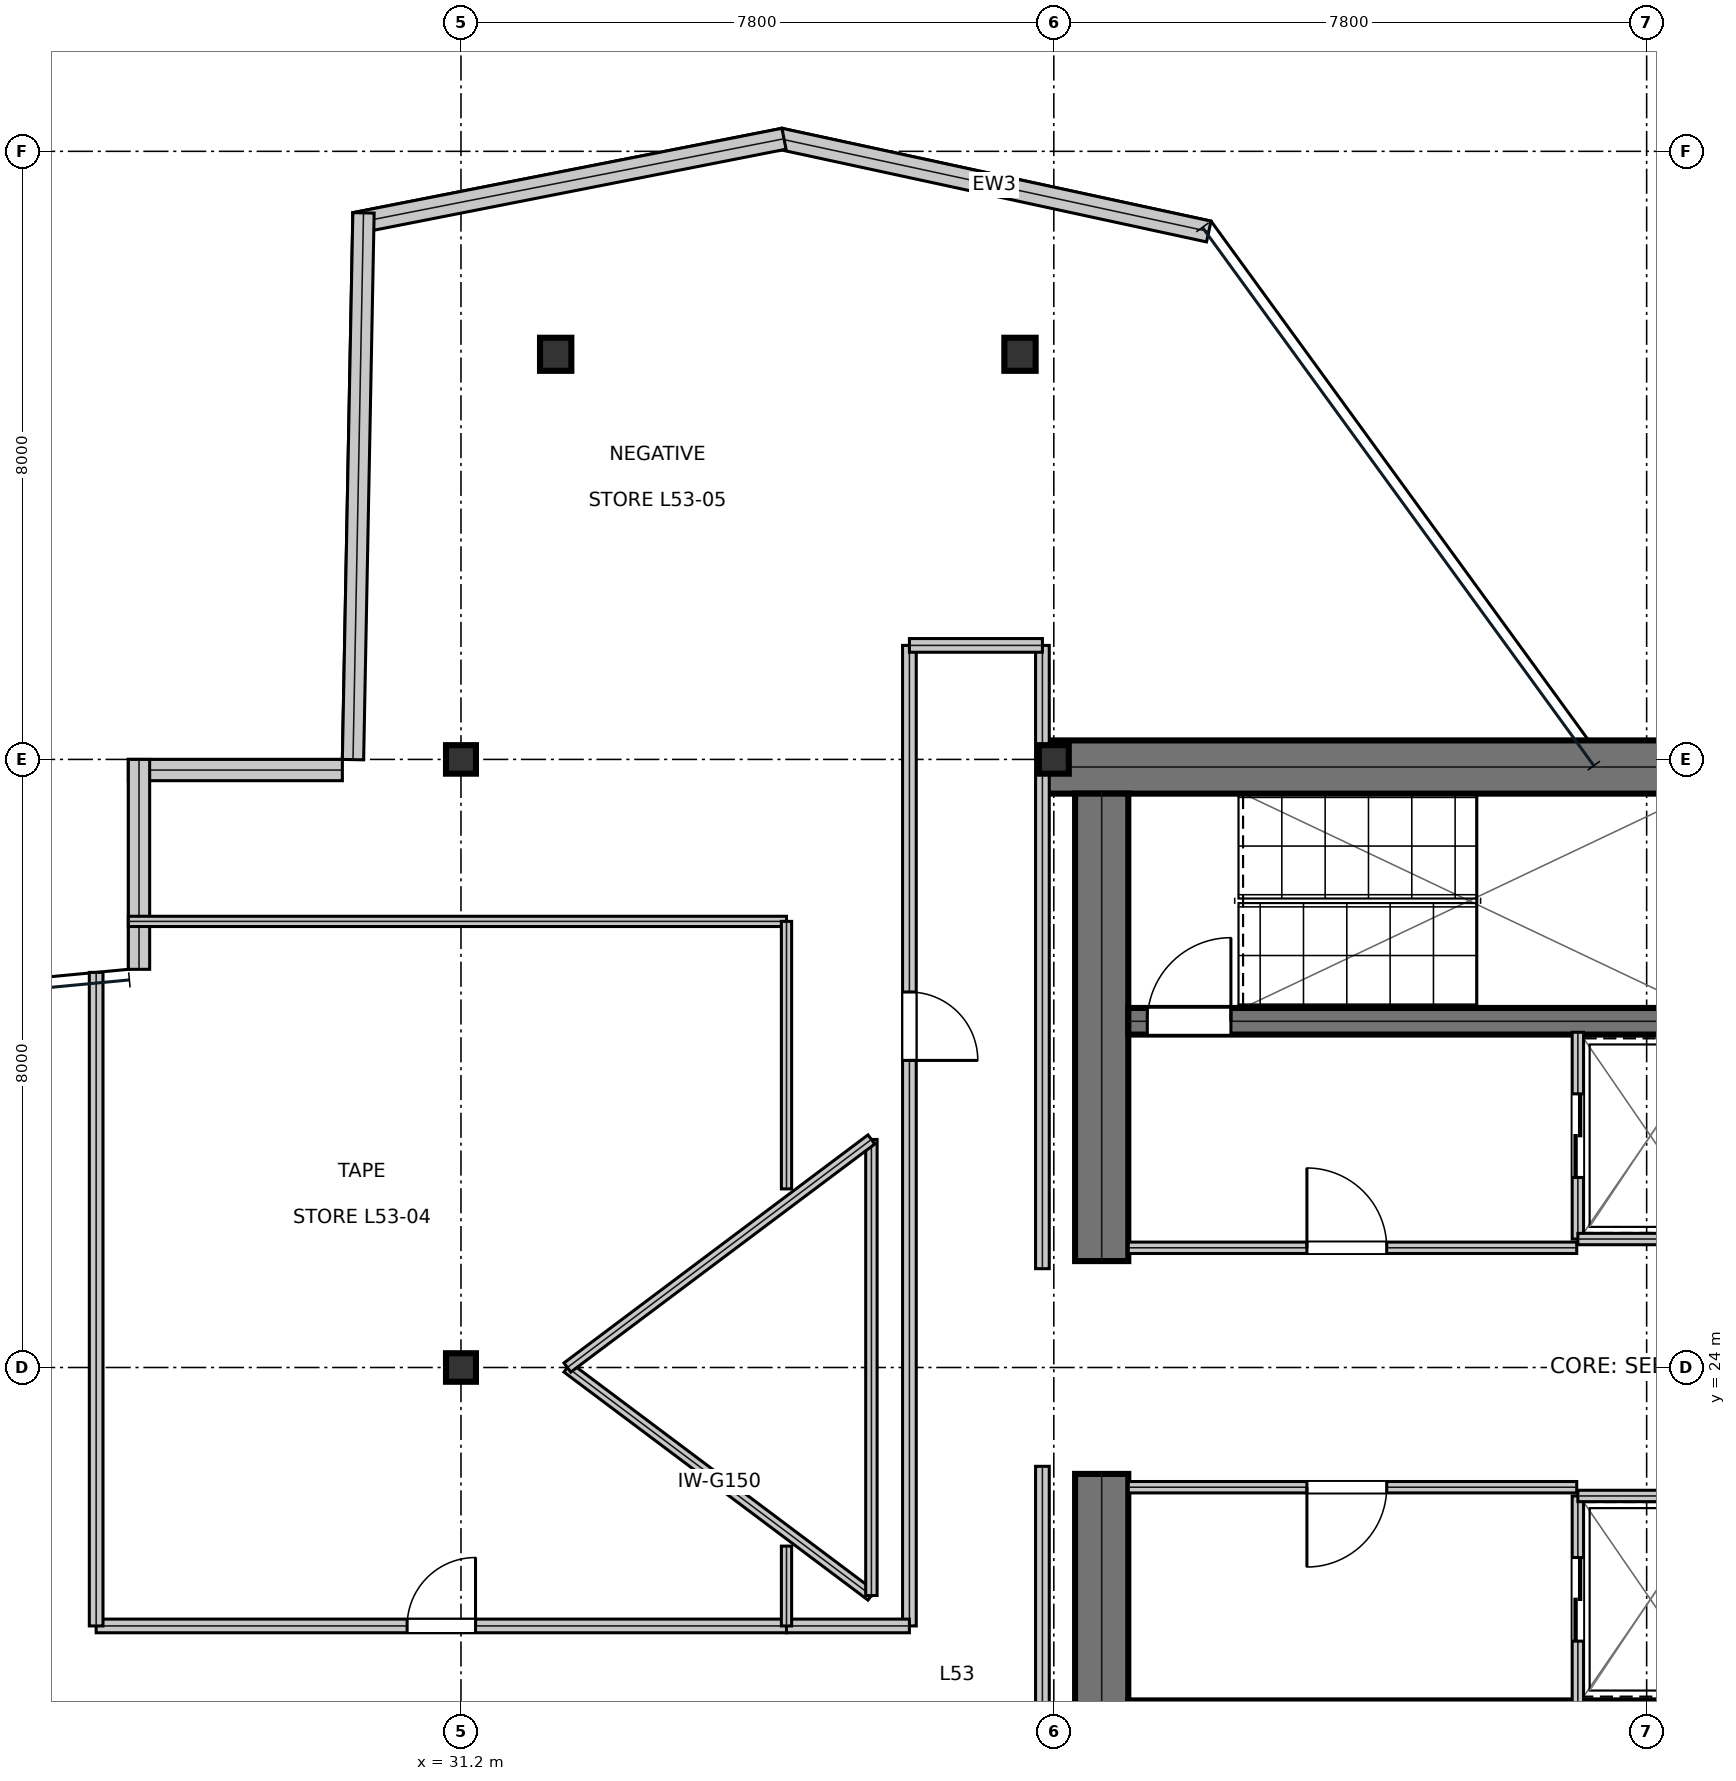
"""IFC4 building model, lengths in metres.
Left out: names, types, materials, properties, quantities, classifications, styles, units other than length and angle.
Written with IfcOpenShell. Run it as: python <this file> out.ifc"""

import sys

from ifc_helpers import new_model, si_unit, direction, frame, frame_2d, origin, origin_2d, place, context, subcontext, project, spatial, rectangle, i_section, extrude, element, fill, save


model = new_model("IFC4")
c1 = context("Model", 3, precision=1e-05, world=origin(), true_north=direction((0.0, 1.0)))
c2 = subcontext(c1, "Body", "Model", "MODEL_VIEW")
j1 = project(units=[si_unit("LENGTHUNIT", "METRE"), si_unit("PLANEANGLEUNIT", "RADIAN")], contexts=[c1])
p1 = place(None, origin())
s1 = spatial("IfcSite", under=j1, at=p1, CompositionType="ELEMENT")
p2 = place(p1, origin())
s2 = spatial("IfcBuilding", under=s1, at=p2, CompositionType="ELEMENT")
p3 = place(p2, frame((0.0, 0.0, 228.3)))
s3 = spatial("IfcBuildingStorey", under=s2, at=p3, CompositionType="ELEMENT", Elevation=228.3)
p4 = place(p3, frame((38.8, 31.9, 0.0), z_axis=(0.0, 0.0, 1.0), x_axis=(1.0, 0.0, 0.0)))
e1 = element("IfcWall", 1, at=p4, inside=s3, PredefinedType="SHEAR", context=c2, shape_type="SweptSolid", body=[
    extrude(rectangle(XDim=16.0, YDim=0.7, at=frame_2d((8.0, 0.0))), origin(), (0.0, 0.0, 1.0), 3.79),
])
for number, where, z_axis, x_axis in (
    (2, (39.63, 16.45, 0.0), (0.0, 0.0, 1.0), (0.0, 1.0, 0.0)),
    (3, (39.63, 25.4, 0.0), (0.0, 0.0, 1.0), (0.0, 1.0, 0.0)),
):
    element("IfcWall", number, at=place(p3, frame(where, z_axis=z_axis, x_axis=x_axis)), inside=s3, PredefinedType="SHEAR", context=c2, shape_type="SweptSolid", body=[
        extrude(rectangle(XDim=6.15, YDim=0.7, at=frame_2d((3.075, 0.0))), origin(), (0.0, 0.0, 1.0), 3.79),
    ])
p5 = place(p3, frame((39.98, 28.555, 0.0), z_axis=(0.0, 0.0, 1.0), x_axis=(1.0, 0.0, 0.0)))
e4 = element("IfcWall", 4, at=p5, inside=s3, PredefinedType="SHEAR", context=c2, shape_type="SweptSolid", body=[
    extrude(rectangle(XDim=7.71, YDim=0.35, at=frame_2d((3.855, 0.0))), origin(), (0.0, 0.0, 1.0), 3.79),
])
p6 = place(p5, frame((0.25, 0.0, 0.0)))
e5 = element("IfcOpeningElement", 5, at=p6, cuts=e4, PredefinedType="OPENING", context=c2, shape_type="SweptSolid", body=[
    extrude(rectangle(XDim=1.1, YDim=2.15, at=frame_2d((0.55, 1.075))), frame((0.0, 0.185, 0.0), z_axis=(0.0, -1.0, 0.0), x_axis=(1.0, 0.0, 0.0)), (0.0, 0.0, 1.0), 0.37),
])
p7 = place(p3, frame((39.98, 19.445, 0.0), z_axis=(0.0, 0.0, 1.0), x_axis=(1.0, 0.0, 0.0)))
e6 = element("IfcWall", 6, at=p7, inside=s3, PredefinedType="SHEAR", context=c2, shape_type="SweptSolid", body=[
    extrude(rectangle(XDim=7.71, YDim=0.35, at=frame_2d((3.855, 0.0))), origin(), (0.0, 0.0, 1.0), 3.79),
])
p8 = place(p7, frame((0.25, 0.0, 0.0)))
e7 = element("IfcOpeningElement", 7, at=p8, cuts=e6, PredefinedType="OPENING", context=c2, shape_type="SweptSolid", body=[
    extrude(rectangle(XDim=1.1, YDim=2.15, at=frame_2d((0.55, 1.075))), frame((0.0, 0.185, 0.0), z_axis=(0.0, -1.0, 0.0), x_axis=(1.0, 0.0, 0.0)), (0.0, 0.0, 1.0), 0.37),
])
for number, where, z_axis, x_axis in (
    (8, (31.2, 24.0, 0.0), (0.0, 0.0, 1.0), (1.0, 0.0, 0.0)),
    (9, (31.2, 32.0, 0.0), (0.0, 0.0, 1.0), (1.0, 0.0, 0.0)),
    (10, (39.0, 32.0, 0.0), (0.0, 0.0, 1.0), (1.0, 0.0, 0.0)),
):
    element("IfcColumn", number, at=place(p3, frame(where, z_axis=z_axis, x_axis=x_axis)), inside=s3, PredefinedType="COLUMN", context=c2, shape_type="SweptSolid", body=[
        extrude(i_section(OverallWidth=0.394, OverallDepth=0.375, WebThickness=0.017, FlangeThickness=0.028, at=origin_2d()), origin(), (0.0, 0.0, 1.0), 4.044),
    ])
for number, where, z_axis, x_axis in (
    (11, (32.446, 37.33, 0.016), (0.0, 0.0, 1.0), (1.0, 0.0, 0.0)),
    (12, (38.555, 37.33, 0.016), (0.0, 0.0, 1.0), (1.0, 0.0, 0.0)),
):
    element("IfcColumn", number, at=place(p3, frame(where, z_axis=z_axis, x_axis=x_axis)), inside=s3, PredefinedType="COLUMN", context=c2, shape_type="SweptSolid", body=[
        extrude(i_section(OverallWidth=0.412, OverallDepth=0.435, WebThickness=0.036, FlangeThickness=0.058, at=origin_2d()), origin(), (0.0, 0.0, 1.0), 4.018),
    ])
p9 = place(p3, frame((41.039, 38.945, 0.0), z_axis=(0.0, 0.0, 1.0), x_axis=(-0.977403545606, 0.211381903286, 0.0)))
e13 = element("IfcWall", 13, at=p9, inside=s3, PredefinedType="STANDARD", context=c2, shape_type="SweptSolid", body=[
    extrude(rectangle(XDim=5.776, YDim=0.28, at=frame_2d((2.888, 0.0))), origin(), (0.0, 0.0, 1.0), 3.79),
])
p10 = place(p3, frame((35.45, 40.166, 0.0), z_axis=(0.0, 0.0, 1.0), x_axis=(-0.981218426529, -0.192899972626, 0.0)))
e14 = element("IfcWall", 14, at=p10, inside=s3, PredefinedType="STANDARD", context=c2, shape_type="SweptSolid", body=[
    extrude(rectangle(XDim=5.754, YDim=0.28, at=frame_2d((2.877, 0.0))), origin(), (0.0, 0.0, 1.0), 3.79),
])
p11 = place(p3, frame((29.917, 39.19, 0.0), z_axis=(0.0, 0.0, 1.0), x_axis=(-0.019207643139, -0.999815516205, 0.0)))
e15 = element("IfcWall", 15, at=p11, inside=s3, PredefinedType="STANDARD", context=c2, shape_type="SweptSolid", body=[
    extrude(rectangle(XDim=7.194, YDim=0.28, at=frame_2d((3.597, 0.0))), origin(), (0.0, 0.0, 1.0), 3.79),
])
p12 = place(p3, frame((29.639, 31.86, 0.0), z_axis=(0.0, 0.0, 1.0), x_axis=(-1.0, 0.0, 0.0)))
e16 = element("IfcWall", 16, at=p12, inside=s3, PredefinedType="STANDARD", context=c2, shape_type="SweptSolid", body=[
    extrude(rectangle(XDim=2.815, YDim=0.28, at=frame_2d((1.408, 0.0))), origin(), (0.0, 0.0, 1.0), 3.79),
])
p13 = place(p3, frame((26.964, 32.0, 0.0), z_axis=(0.0, 0.0, 1.0), x_axis=(0.0, -1.0, 0.0)))
e17 = element("IfcWall", 17, at=p13, inside=s3, PredefinedType="STANDARD", context=c2, shape_type="SweptSolid", body=[
    extrude(rectangle(XDim=2.761, YDim=0.28, at=frame_2d((1.381, 0.0))), origin(), (0.0, 0.0, 1.0), 3.319),
])
p14 = place(p3, frame((39.98, 25.575, 0.0), z_axis=(0.0, 0.0, 1.0), x_axis=(1.0, 0.0, 0.0)))
e18 = element("IfcWall", 18, at=p14, inside=s3, PredefinedType="PARTITIONING", context=c2, shape_type="SweptSolid", body=[
    extrude(rectangle(XDim=5.9, YDim=0.15, at=frame_2d((2.95, 0.0))), origin(), (0.0, 0.0, 1.0), 3.79),
])
p15 = place(p14, frame((2.35, 0.0, 0.0)))
e19 = element("IfcOpeningElement", 19, at=p15, cuts=e18, PredefinedType="OPENING", context=c2, shape_type="SweptSolid", body=[
    extrude(rectangle(XDim=1.05, YDim=2.15, at=frame_2d((0.525, 1.075))), frame((0.0, 0.085, 0.0), z_axis=(0.0, -1.0, 0.0), x_axis=(1.0, 0.0, 0.0)), (0.0, 0.0, 1.0), 0.17),
])
p16 = place(p3, frame((39.98, 22.425, 0.0), z_axis=(0.0, 0.0, 1.0), x_axis=(1.0, 0.0, 0.0)))
e20 = element("IfcWall", 20, at=p16, inside=s3, PredefinedType="PARTITIONING", context=c2, shape_type="SweptSolid", body=[
    extrude(rectangle(XDim=5.9, YDim=0.15, at=frame_2d((2.95, 0.0))), origin(), (0.0, 0.0, 1.0), 3.79),
])
p17 = place(p16, frame((2.35, 0.0, 0.0)))
e21 = element("IfcOpeningElement", 21, at=p17, cuts=e20, PredefinedType="OPENING", context=c2, shape_type="SweptSolid", body=[
    extrude(rectangle(XDim=1.05, YDim=2.15, at=frame_2d((0.525, 1.075))), frame((0.0, 0.085, 0.0), z_axis=(0.0, -1.0, 0.0), x_axis=(1.0, 0.0, 0.0)), (0.0, 0.0, 1.0), 0.17),
])
p18 = place(p3, frame((45.895, 25.69, 0.0), z_axis=(0.0, 0.0, 1.0), x_axis=(0.0, 1.0, 0.0)))
e22 = element("IfcWall", 22, at=p18, inside=s3, PredefinedType="PARTITIONING", context=c2, shape_type="SweptSolid", body=[
    extrude(rectangle(XDim=2.72, YDim=0.15, at=frame_2d((1.36, 0.0))), origin(), (0.0, 0.0, 1.0), 3.79),
])
p19 = place(p18, frame((0.81, 0.0, 0.0)))
e23 = element("IfcOpeningElement", 23, at=p19, cuts=e22, PredefinedType="OPENING", context=c2, shape_type="SweptSolid", body=[
    extrude(rectangle(XDim=1.1, YDim=2.15, at=frame_2d((0.55, 1.075))), frame((0.0, 0.085, 0.0), z_axis=(0.0, -1.0, 0.0), x_axis=(1.0, 0.0, 0.0)), (0.0, 0.0, 1.0), 0.17),
])
p20 = place(p3, frame((45.895, 25.69, 0.0), z_axis=(0.0, 0.0, 1.0), x_axis=(1.0, 0.0, 0.0)))
e24 = element("IfcWall", 24, at=p20, inside=s3, PredefinedType="PARTITIONING", context=c2, shape_type="SweptSolid", body=[
    extrude(rectangle(XDim=1.915, YDim=0.15, at=frame_2d((0.958, 0.0))), origin(), (0.0, 0.0, 1.0), 3.79),
])
p21 = place(p3, frame((45.895, 19.59, 0.0), z_axis=(0.0, 0.0, 1.0), x_axis=(0.0, 1.0, 0.0)))
e25 = element("IfcWall", 25, at=p21, inside=s3, PredefinedType="PARTITIONING", context=c2, shape_type="SweptSolid", body=[
    extrude(rectangle(XDim=2.72, YDim=0.15, at=frame_2d((1.36, 0.0))), origin(), (0.0, 0.0, 1.0), 3.79),
])
p22 = place(p21, frame((0.81, 0.0, 0.0)))
e26 = element("IfcOpeningElement", 26, at=p22, cuts=e25, PredefinedType="OPENING", context=c2, shape_type="SweptSolid", body=[
    extrude(rectangle(XDim=1.1, YDim=2.15, at=frame_2d((0.55, 1.075))), frame((0.0, 0.085, 0.0), z_axis=(0.0, -1.0, 0.0), x_axis=(1.0, 0.0, 0.0)), (0.0, 0.0, 1.0), 0.17),
])
p23 = place(p3, frame((45.895, 22.31, 0.0), z_axis=(0.0, 0.0, 1.0), x_axis=(1.0, 0.0, 0.0)))
e27 = element("IfcWall", 27, at=p23, inside=s3, PredefinedType="PARTITIONING", context=c2, shape_type="SweptSolid", body=[
    extrude(rectangle(XDim=1.915, YDim=0.15, at=frame_2d((0.958, 0.0))), origin(), (0.0, 0.0, 1.0), 3.79),
])
p24 = place(p3, frame((26.4, 20.6, 0.0), z_axis=(0.0, 0.0, 1.0), x_axis=(1.0, 0.0, 0.0)))
e28 = element("IfcWall", 28, at=p24, inside=s3, PredefinedType="SOLIDWALL", context=c2, shape_type="SweptSolid", body=[
    extrude(rectangle(XDim=9.083, YDim=0.18, at=frame_2d((4.542, 0.0))), origin(), (0.0, 0.0, 1.0), 3.241),
])
p25 = place(p24, frame((4.092, 0.0, 0.0)))
e29 = element("IfcOpeningElement", 29, at=p25, cuts=e28, PredefinedType="OPENING", context=c2, shape_type="SweptSolid", body=[
    extrude(rectangle(XDim=0.9, YDim=2.15, at=frame_2d((0.45, 1.075))), frame((0.0, 0.1, 0.0), z_axis=(0.0, -1.0, 0.0), x_axis=(1.0, 0.0, 0.0)), (0.0, 0.0, 1.0), 0.2),
])
p26 = place(p3, frame((37.1, 20.6, 0.0), z_axis=(0.0, 0.0, 1.0), x_axis=(0.0, 1.0, 0.0)))
e30 = element("IfcWall", 30, at=p26, inside=s3, PredefinedType="SOLIDWALL", context=c2, shape_type="SweptSolid", body=[
    extrude(rectangle(XDim=12.9, YDim=0.18, at=frame_2d((6.45, 0.0))), origin(), (0.0, 0.0, 1.0), 3.241),
])
p27 = place(p26, frame((7.44, 0.0, 0.0)))
e31 = element("IfcOpeningElement", 31, at=p27, cuts=e30, PredefinedType="OPENING", context=c2, shape_type="SweptSolid", body=[
    extrude(rectangle(XDim=0.9, YDim=2.15, at=frame_2d((0.45, 1.075))), frame((0.0, 0.1, 0.0), z_axis=(0.0, -1.0, 0.0), x_axis=(1.0, 0.0, 0.0)), (0.0, 0.0, 1.0), 0.2),
])
p28 = place(p3, frame((38.85, 14.5, 0.0), z_axis=(0.0, 0.0, 1.0), x_axis=(0.0, 1.0, 0.0)))
e32 = element("IfcWall", 32, at=p28, inside=s3, PredefinedType="SOLIDWALL", context=c2, shape_type="SweptSolid", body=[
    extrude(rectangle(XDim=8.2, YDim=0.18, at=frame_2d((4.1, 0.0))), origin(), (0.0, 0.0, 1.0), 3.241),
])
p29 = place(p3, frame((26.4, 20.6, 0.0), z_axis=(0.0, 0.0, 1.0), x_axis=(0.0, 1.0, 0.0)))
e33 = element("IfcWall", 33, at=p29, inside=s3, PredefinedType="SOLIDWALL", context=c2, shape_type="SweptSolid", body=[
    extrude(rectangle(XDim=8.598, YDim=0.18, at=frame_2d((4.299, 0.0))), origin(), (0.0, 0.0, 1.0), 3.241),
])
p30 = place(p3, frame((38.85, 25.3, 0.0), z_axis=(0.0, 0.0, 1.0), x_axis=(0.0, 1.0, 0.0)))
e34 = element("IfcWall", 34, at=p30, inside=s3, PredefinedType="SOLIDWALL", context=c2, shape_type="SweptSolid", body=[
    extrude(rectangle(XDim=8.2, YDim=0.18, at=frame_2d((4.1, 0.0))), origin(), (0.0, 0.0, 1.0), 3.241),
])
p31 = place(p3, frame((37.1, 33.5, 0.0), z_axis=(0.0, 0.0, 1.0), x_axis=(1.0, 0.0, 0.0)))
e35 = element("IfcWall", 35, at=p31, inside=s3, PredefinedType="SOLIDWALL", context=c2, shape_type="SweptSolid", body=[
    extrude(rectangle(XDim=1.75, YDim=0.18, at=frame_2d((0.875, 0.0))), origin(), (0.0, 0.0, 1.0), 3.241),
])
p32 = place(p3, frame((35.483, 20.6, 0.0), z_axis=(0.0, 0.0, 1.0), x_axis=(1.0, 0.0, 0.0)))
e36 = element("IfcWall", 36, at=p32, inside=s3, PredefinedType="SOLIDWALL", context=c2, shape_type="SweptSolid", body=[
    extrude(rectangle(XDim=1.617, YDim=0.18, at=frame_2d((0.809, 0.0))), origin(), (0.0, 0.0, 1.0), 3.468),
])
p33 = place(p3, frame((26.824, 29.869, 0.0), z_axis=(0.0, 0.0, 1.0), x_axis=(1.0, 0.0, 0.0)))
e37 = element("IfcWall", 37, at=p33, inside=s3, PredefinedType="PARTITIONING", context=c2, shape_type="SweptSolid", body=[
    extrude(rectangle(XDim=8.659, YDim=0.135, at=frame_2d((4.33, 0.0))), origin(), (0.0, 0.0, 1.0), 3.241),
])
p34 = place(p3, frame((35.483, 26.35, 0.0), z_axis=(0.0, 0.0, 1.0), x_axis=(0.0, 1.0, 0.0)))
e38 = element("IfcWall", 38, at=p34, inside=s3, PredefinedType="PARTITIONING", context=c2, shape_type="SweptSolid", body=[
    extrude(rectangle(XDim=3.519, YDim=0.135, at=frame_2d((1.76, 0.0))), origin(), (0.0, 0.0, 1.0), 3.468),
])
p35 = place(p3, frame((35.483, 20.6, 0.0), z_axis=(0.0, 0.0, 1.0), x_axis=(0.0, 1.0, 0.0)))
e39 = element("IfcWall", 39, at=p35, inside=s3, PredefinedType="PARTITIONING", context=c2, shape_type="SweptSolid", body=[
    extrude(rectangle(XDim=1.05, YDim=0.135, at=frame_2d((0.525, 0.0))), origin(), (0.0, 0.0, 1.0), 3.79),
])
p36 = place(p3, frame((32.6, 24.0, 0.0), z_axis=(0.0, 0.0, 1.0), x_axis=(0.8, -0.6, 0.0)))
e40 = element("IfcWall", 40, at=p36, inside=s3, PredefinedType="MOVABLE", context=c2, shape_type="SweptSolid", body=[
    extrude(rectangle(XDim=5.0, YDim=0.15, at=frame_2d((2.5, 0.0))), origin(), (0.0, 0.0, 1.0), 3.79),
])
p37 = place(p3, frame((36.6, 21.0, 0.0), z_axis=(0.0, 0.0, 1.0), x_axis=(0.0, 1.0, 0.0)))
e41 = element("IfcWall", 41, at=p37, inside=s3, PredefinedType="MOVABLE", context=c2, shape_type="SweptSolid", body=[
    extrude(rectangle(XDim=6.0, YDim=0.15, at=frame_2d((3.0, 0.0))), origin(), (0.0, 0.0, 1.0), 3.79),
])
p38 = place(p3, frame((36.6, 27.0, 0.0), z_axis=(0.0, 0.0, 1.0), x_axis=(-0.8, -0.6, 0.0)))
e42 = element("IfcWall", 42, at=p38, inside=s3, PredefinedType="MOVABLE", context=c2, shape_type="SweptSolid", body=[
    extrude(rectangle(XDim=5.0, YDim=0.15, at=frame_2d((2.5, 0.0))), origin(), (0.0, 0.0, 1.0), 3.79),
])
p39 = place(p15, origin())
e43 = element("IfcDoor", 43, at=p39, inside=s3, OperationType="SINGLE_SWING_LEFT", PredefinedType="DOOR", context=c2, shape_type="SweptSolid", body=[
    extrude(rectangle(XDim=1.05, YDim=2.15, at=frame_2d((0.525, 1.075))), frame((0.0, 0.025, 0.0), z_axis=(0.0, -1.0, 0.0), x_axis=(1.0, 0.0, 0.0)), (0.0, 0.0, 1.0), 0.05),
])
fill(e19, e43)
p40 = place(p17, frame((1.05, 0.0, 0.0), z_axis=(0.0, 0.0, 1.0), x_axis=(-1.0, 0.0, 0.0)))
e44 = element("IfcDoor", 44, at=p40, inside=s3, OperationType="SINGLE_SWING_RIGHT", PredefinedType="DOOR", context=c2, shape_type="SweptSolid", body=[
    extrude(rectangle(XDim=1.05, YDim=2.15, at=frame_2d((0.525, 1.075))), frame((0.0, 0.025, 0.0), z_axis=(0.0, -1.0, 0.0), x_axis=(1.0, 0.0, 0.0)), (0.0, 0.0, 1.0), 0.05),
])
fill(e21, e44)
p41 = place(p19, frame((1.1, 0.0, 0.0), z_axis=(0.0, 0.0, 1.0), x_axis=(-1.0, 0.0, 0.0)))
e45 = element("IfcDoor", 45, at=p41, inside=s3, OperationType="DOUBLE_DOOR_SLIDING", PredefinedType="DOOR", context=c2, shape_type="SweptSolid", body=[
    extrude(rectangle(XDim=1.1, YDim=2.15, at=frame_2d((0.55, 1.075))), frame((0.0, 0.025, 0.0), z_axis=(0.0, -1.0, 0.0), x_axis=(1.0, 0.0, 0.0)), (0.0, 0.0, 1.0), 0.05),
])
fill(e23, e45)
p42 = place(p22, frame((1.1, 0.0, 0.0), z_axis=(0.0, 0.0, 1.0), x_axis=(-1.0, 0.0, 0.0)))
e46 = element("IfcDoor", 46, at=p42, inside=s3, OperationType="DOUBLE_DOOR_SLIDING", PredefinedType="DOOR", context=c2, shape_type="SweptSolid", body=[
    extrude(rectangle(XDim=1.1, YDim=2.15, at=frame_2d((0.55, 1.075))), frame((0.0, 0.025, 0.0), z_axis=(0.0, -1.0, 0.0), x_axis=(1.0, 0.0, 0.0)), (0.0, 0.0, 1.0), 0.05),
])
fill(e26, e46)
p43 = place(p25, origin())
e47 = element("IfcDoor", 47, at=p43, inside=s3, OperationType="SINGLE_SWING_RIGHT", PredefinedType="DOOR", context=c2, shape_type="SweptSolid", body=[
    extrude(rectangle(XDim=0.9, YDim=2.15, at=frame_2d((0.45, 1.075))), frame((0.0, 0.025, 0.0), z_axis=(0.0, -1.0, 0.0), x_axis=(1.0, 0.0, 0.0)), (0.0, 0.0, 1.0), 0.05),
])
fill(e29, e47)
p44 = place(p27, frame((0.9, 0.0, 0.0), z_axis=(0.0, 0.0, 1.0), x_axis=(-1.0, 0.0, 0.0)))
e48 = element("IfcDoor", 48, at=p44, inside=s3, OperationType="SINGLE_SWING_RIGHT", PredefinedType="DOOR", context=c2, shape_type="SweptSolid", body=[
    extrude(rectangle(XDim=0.9, YDim=2.15, at=frame_2d((0.45, 1.075))), frame((0.0, 0.025, 0.0), z_axis=(0.0, -1.0, 0.0), x_axis=(1.0, 0.0, 0.0)), (0.0, 0.0, 1.0), 0.05),
])
fill(e31, e48)
p45 = place(p6, origin())
e49 = element("IfcDoor", 49, at=p45, inside=s3, OperationType="SINGLE_SWING_RIGHT", PredefinedType="DOOR", context=c2, shape_type="SweptSolid", body=[
    extrude(rectangle(XDim=1.1, YDim=2.15, at=frame_2d((0.55, 1.075))), frame((0.0, 0.025, 0.0), z_axis=(0.0, -1.0, 0.0), x_axis=(1.0, 0.0, 0.0)), (0.0, 0.0, 1.0), 0.05),
])
fill(e5, e49)
save(model, sys.argv[1])
